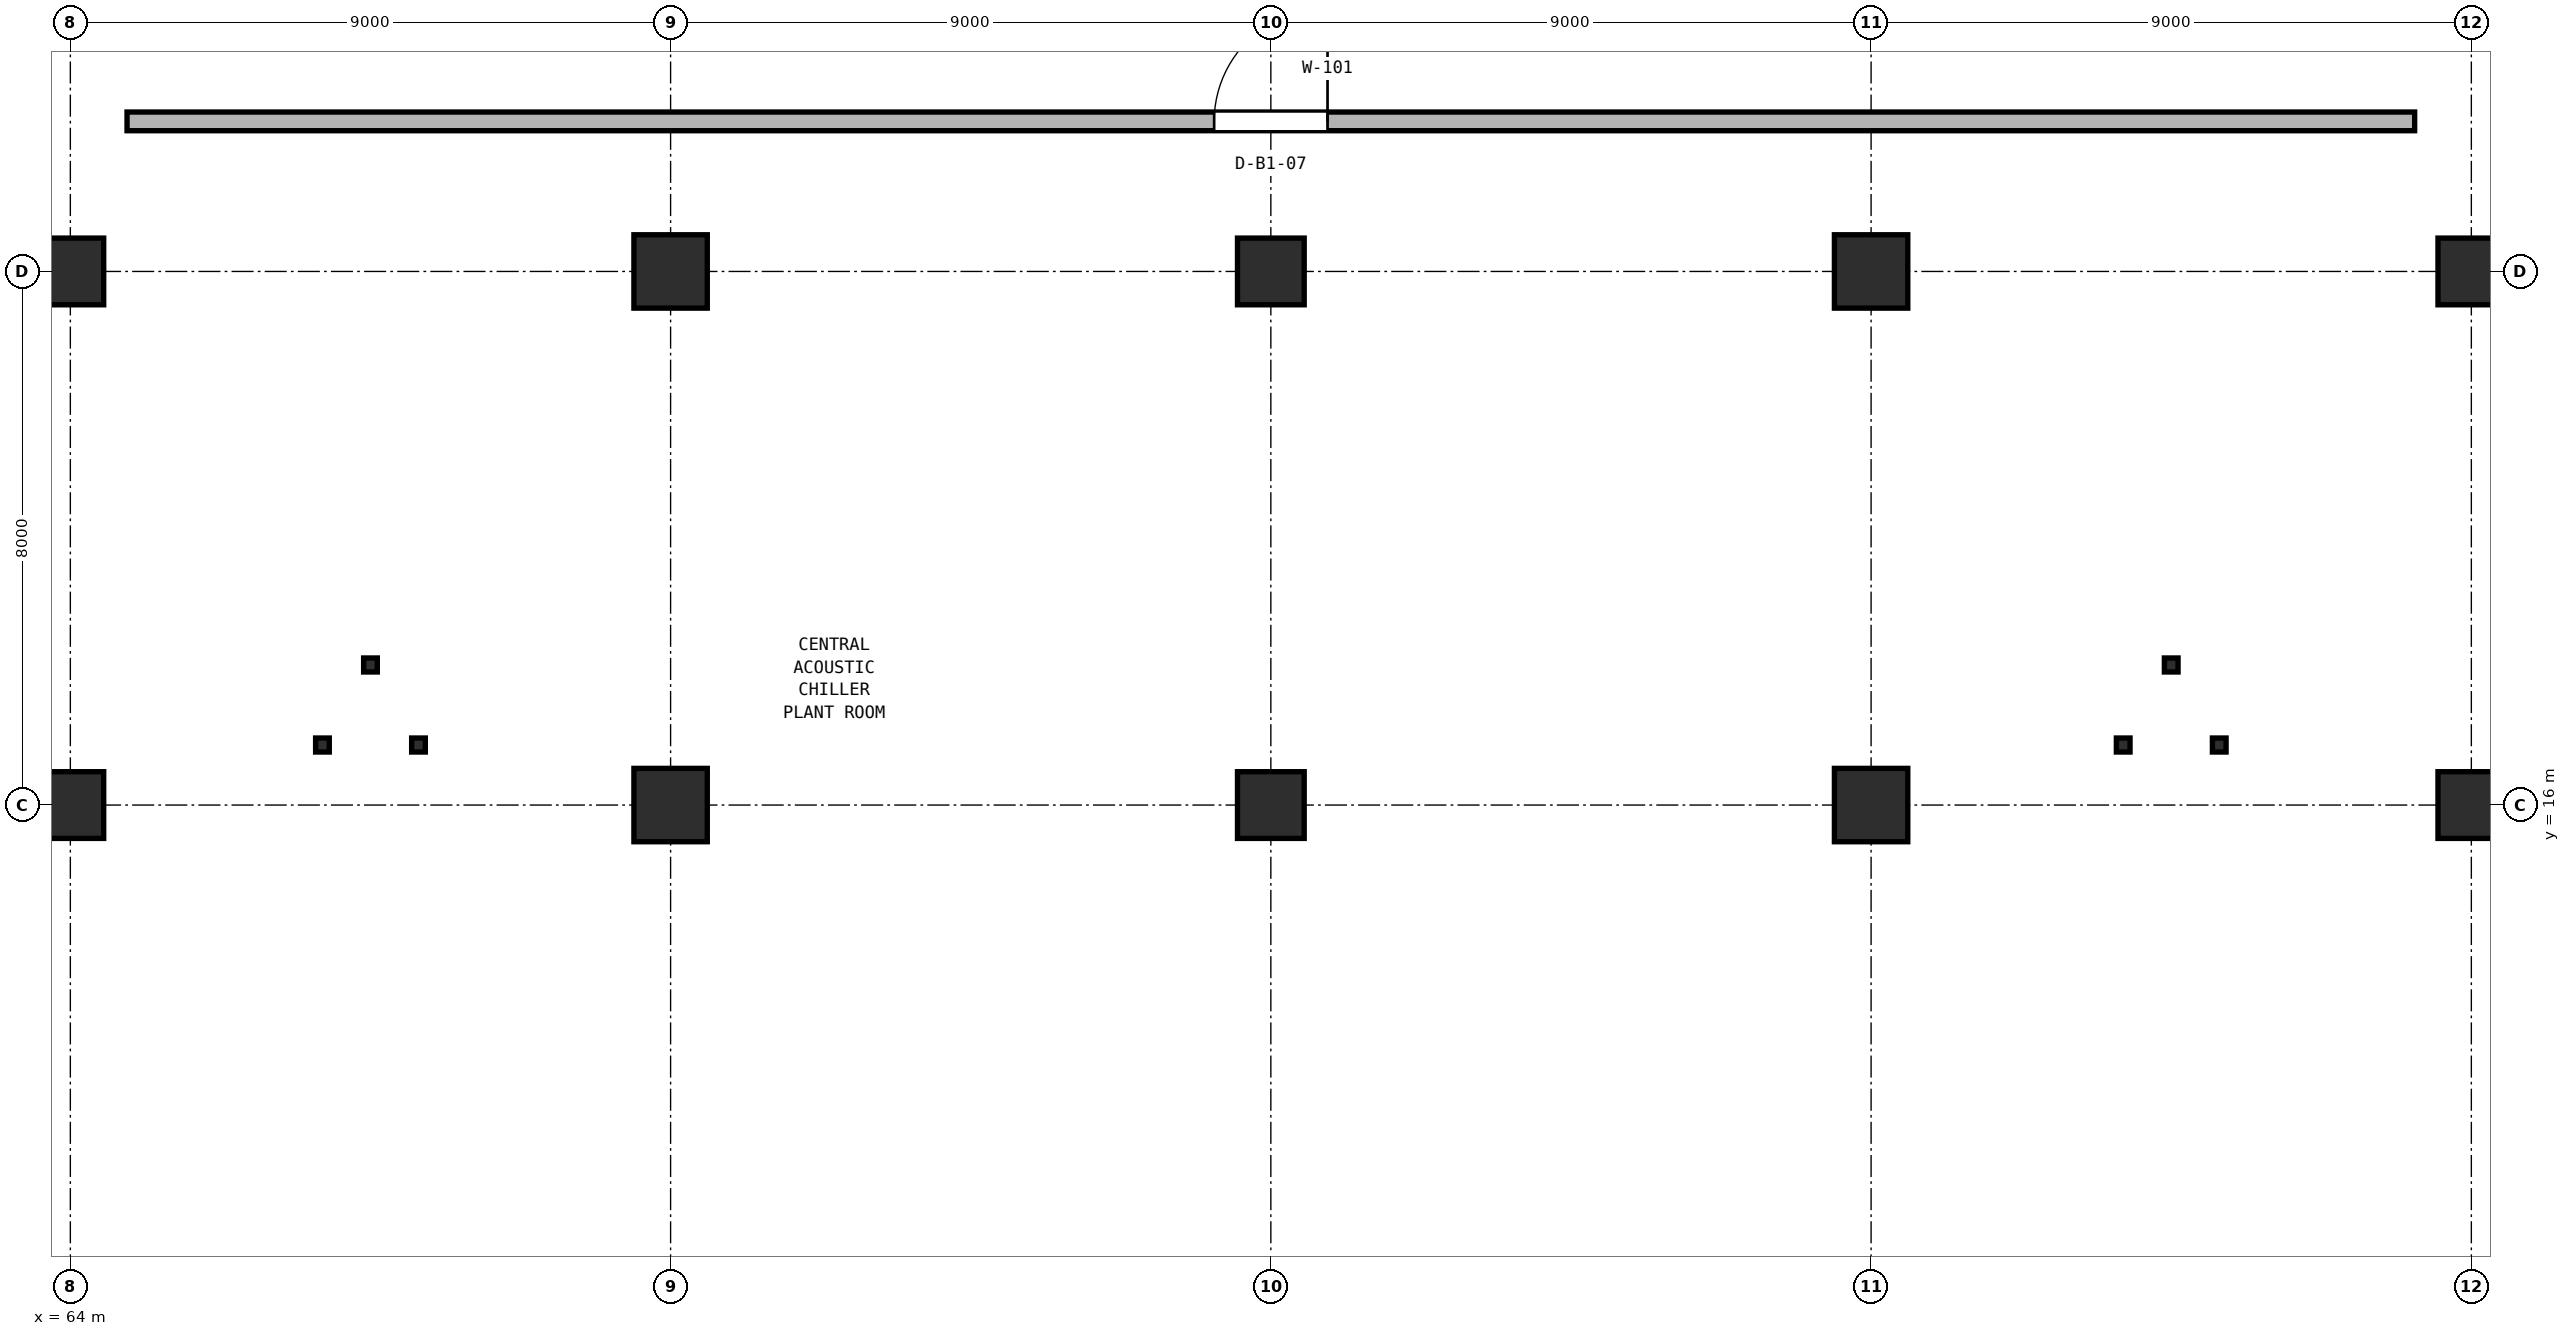
"""IFC4 building model, lengths in metres.
Left out: names, types, materials, properties, quantities, classifications, styles, units other than length and angle.
Written with IfcOpenShell. Run it as: python <this file> out.ifc"""

import sys

from ifc_helpers import new_model, si_unit, direction, frame, frame_2d, origin, origin_2d, place, context, subcontext, project, spatial, rectangle, i_section, extrude, element, fill, save


model = new_model("IFC4")
c1 = context("Model", 3, precision=1e-05, world=origin(), true_north=direction((0.0, 1.0)))
c2 = subcontext(c1, "Body", "Model", "MODEL_VIEW")
j1 = project(units=[si_unit("LENGTHUNIT", "METRE"), si_unit("PLANEANGLEUNIT", "RADIAN")], contexts=[c1])
p1 = place(None, origin())
s1 = spatial("IfcSite", under=j1, at=p1, CompositionType="ELEMENT")
p2 = place(p1, origin())
s2 = spatial("IfcBuilding", under=s1, at=p2, CompositionType="ELEMENT")
p3 = place(p2, frame((0.0, 0.0, -4.8)))
s3 = spatial("IfcBuildingStorey", under=s2, at=p3, CompositionType="ELEMENT", Elevation=-4.8)
for number, where, z_axis, x_axis in (
    (1, (64.0, 16.0, -0.4), (0.0, 0.0, 1.0), (1.0, 0.0, 0.0)),
    (2, (64.0, 24.0, -0.4), (0.0, 0.0, 1.0), (1.0, 0.0, 0.0)),
):
    element("IfcColumn", number, at=place(p3, frame(where, z_axis=z_axis, x_axis=x_axis)), inside=s3, PredefinedType="COLUMN", context=c2, shape_type="SweptSolid", body=[
        extrude(rectangle(XDim=1.0, YDim=1.0, at=origin_2d()), origin(), (0.0, 0.0, 1.0), 4.9),
    ])
for number, where, z_axis, x_axis in (
    (3, (73.0, 16.0, -0.4), (0.0, 0.0, 1.0), (1.0, 0.0, 0.0)),
    (4, (73.0, 24.0, -0.4), (0.0, 0.0, 1.0), (1.0, 0.0, 0.0)),
):
    element("IfcColumn", number, at=place(p3, frame(where, z_axis=z_axis, x_axis=x_axis)), inside=s3, PredefinedType="COLUMN", context=c2, shape_type="SweptSolid", body=[
        extrude(rectangle(XDim=1.1, YDim=1.1, at=origin_2d()), origin(), (0.0, 0.0, 1.0), 4.9),
    ])
for number, where, z_axis, x_axis in (
    (5, (82.0, 16.0, -0.4), (0.0, 0.0, 1.0), (1.0, 0.0, 0.0)),
    (6, (82.0, 24.0, -0.4), (0.0, 0.0, 1.0), (1.0, 0.0, 0.0)),
):
    element("IfcColumn", number, at=place(p3, frame(where, z_axis=z_axis, x_axis=x_axis)), inside=s3, PredefinedType="COLUMN", context=c2, shape_type="SweptSolid", body=[
        extrude(rectangle(XDim=1.0, YDim=1.0, at=origin_2d()), origin(), (0.0, 0.0, 1.0), 4.9),
    ])
for number, where, z_axis, x_axis in (
    (7, (91.0, 16.0, -0.4), (0.0, 0.0, 1.0), (1.0, 0.0, 0.0)),
    (8, (91.0, 24.0, -0.4), (0.0, 0.0, 1.0), (1.0, 0.0, 0.0)),
):
    element("IfcColumn", number, at=place(p3, frame(where, z_axis=z_axis, x_axis=x_axis)), inside=s3, PredefinedType="COLUMN", context=c2, shape_type="SweptSolid", body=[
        extrude(rectangle(XDim=1.1, YDim=1.1, at=origin_2d()), origin(), (0.0, 0.0, 1.0), 4.9),
    ])
for number, where, z_axis, x_axis in (
    (9, (100.0, 16.0, -0.4), (0.0, 0.0, 1.0), (1.0, 0.0, 0.0)),
    (10, (100.0, 24.0, -0.4), (0.0, 0.0, 1.0), (1.0, 0.0, 0.0)),
):
    element("IfcColumn", number, at=place(p3, frame(where, z_axis=z_axis, x_axis=x_axis)), inside=s3, PredefinedType="COLUMN", context=c2, shape_type="SweptSolid", body=[
        extrude(rectangle(XDim=1.0, YDim=1.0, at=origin_2d()), origin(), (0.0, 0.0, 1.0), 4.9),
    ])
for number, where, z_axis, x_axis in (
    (11, (67.78, 16.9, -0.4), (0.0, 0.0, 1.0), (1.0, 0.0, 0.0)),
    (12, (69.22, 16.9, -0.4), (0.0, 0.0, 1.0), (1.0, 0.0, 0.0)),
    (13, (68.5, 18.1, -0.4), (0.0, 0.0, 1.0), (1.0, 0.0, 0.0)),
    (14, (94.78, 16.9, -0.4), (0.0, 0.0, 1.0), (1.0, 0.0, 0.0)),
    (15, (96.22, 16.9, -0.4), (0.0, 0.0, 1.0), (1.0, 0.0, 0.0)),
    (16, (95.5, 18.1, -0.4), (0.0, 0.0, 1.0), (1.0, 0.0, 0.0)),
):
    element("IfcColumn", number, at=place(p3, frame(where, z_axis=z_axis, x_axis=x_axis)), inside=s3, PredefinedType="COLUMN", context=c2, shape_type="SweptSolid", body=[
        extrude(i_section(OverallWidth=0.205, OverallDepth=0.21, WebThickness=0.009, FlangeThickness=0.014, FilletRadius=0.011, at=origin_2d()), origin(), (0.0, 0.0, 1.0), 4.9),
    ])
p4 = place(p3, frame((64.85, 26.25, 0.0), z_axis=(0.0, 0.0, 1.0), x_axis=(1.0, 0.0, 0.0)))
e17 = element("IfcWall", 17, at=p4, inside=s3, PredefinedType="PARTITIONING", context=c2, shape_type="SweptSolid", body=[
    extrude(rectangle(XDim=34.3, YDim=0.28, at=frame_2d((17.15, 0.0))), origin(), (0.0, 0.0, 1.0), 4.45),
])
p5 = place(p4, frame((16.3, 0.0, 0.0)))
e18 = element("IfcOpeningElement", 18, at=p5, cuts=e17, PredefinedType="OPENING", context=c2, shape_type="SweptSolid", body=[
    extrude(rectangle(XDim=1.7, YDim=2.25, at=frame_2d((0.85, 1.125))), frame((0.0, 0.15, 0.0), z_axis=(0.0, -1.0, 0.0), x_axis=(1.0, 0.0, 0.0)), (0.0, 0.0, 1.0), 0.3),
])
p6 = place(p5, origin())
e19 = element("IfcDoor", 19, at=p6, inside=s3, OperationType="SINGLE_SWING_RIGHT", PredefinedType="DOOR", context=c2, shape_type="SweptSolid", body=[
    extrude(rectangle(XDim=1.7, YDim=2.25, at=frame_2d((0.85, 1.125))), frame((0.0, 0.025, 0.0), z_axis=(0.0, -1.0, 0.0), x_axis=(1.0, 0.0, 0.0)), (0.0, 0.0, 1.0), 0.05),
])
fill(e18, e19)
save(model, sys.argv[1])
